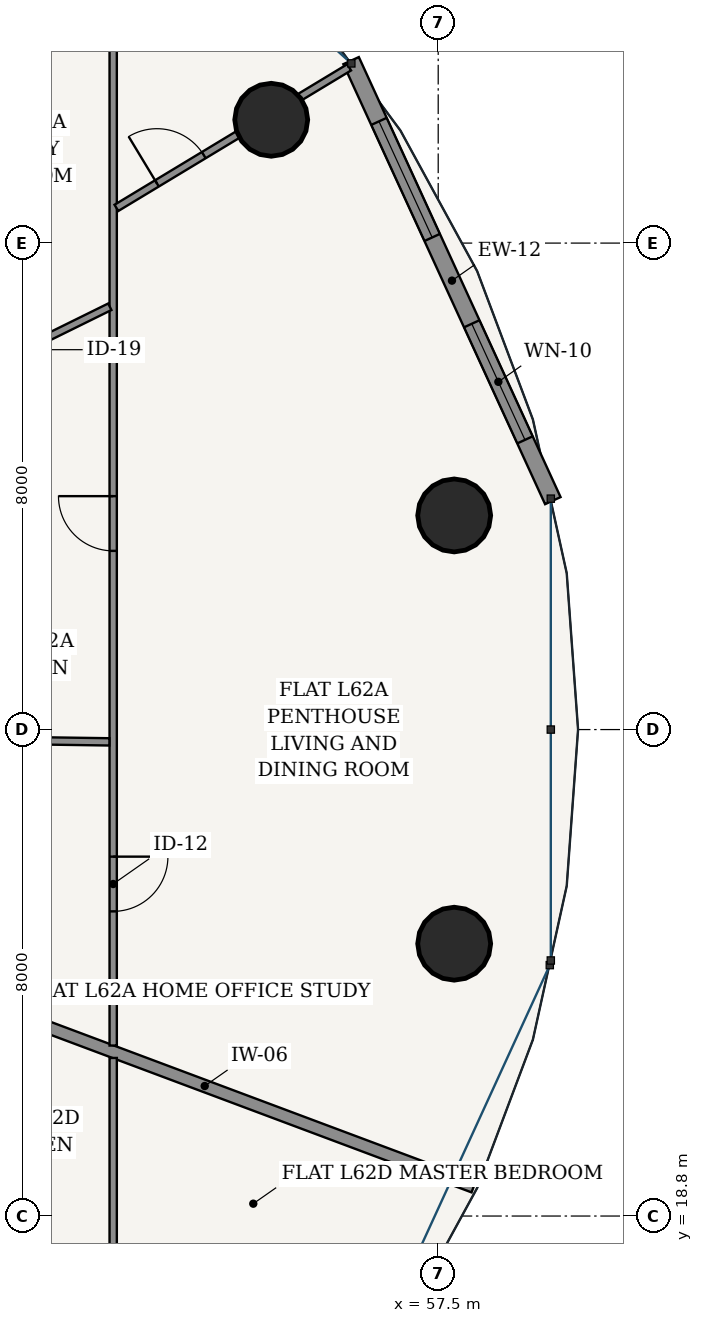
"""IFC4 building model, lengths in metres.
Left out: names, types, materials, properties, quantities, classifications, styles, units other than length and angle.
Written with IfcOpenShell. Run it as: python <this file> out.ifc"""

import sys

from ifc_helpers import new_model, si_unit, direction, frame, frame_2d, origin, origin_2d, place, context, subcontext, project, spatial, rectangle, hollow_circle, extrude, source, transform, mapped, element, fill, save


model = new_model("IFC4")
c1 = context("Model", 3, precision=1e-05, world=origin(), true_north=direction((-0.2419218956, 0.970295726276)))
c2 = subcontext(c1, "Body", "Model", "MODEL_VIEW")
j1 = project(units=[si_unit("LENGTHUNIT", "METRE"), si_unit("PLANEANGLEUNIT", "RADIAN")], contexts=[c1])
p1 = place(None, origin())
s1 = spatial("IfcSite", under=j1, at=p1, CompositionType="ELEMENT")
p2 = place(p1, origin())
s2 = spatial("IfcBuilding", under=s1, at=p2, CompositionType="ELEMENT")
p3 = place(p2, frame((0.0, 0.0, 235.6)))
s3 = spatial("IfcBuildingStorey", under=s2, at=p3, CompositionType="ELEMENT", Elevation=235.6)
for number, where, z_axis, x_axis in (
    (1, (57.763, 30.321, 0.0), (0.0, 0.0, 1.0), (1.0, 0.0, 0.0)),
    (2, (54.754, 36.828, 0.0), (0.0, 0.0, 1.0), (1.0, 0.0, 0.0)),
    (3, (57.763, 23.279, 0.0), (0.0, 0.0, 1.0), (1.0, 0.0, 0.0)),
):
    element("IfcColumn", number, at=place(p3, frame(where, z_axis=z_axis, x_axis=x_axis)), inside=s3, PredefinedType="COLUMN", context=c2, shape_type="SweptSolid", body=[
        extrude(hollow_circle(Radius=0.6, WallThickness=0.038, at=origin_2d()), origin(), (0.0, 0.0, 1.0), 3.7),
    ])
p4 = place(p3, frame((59.385, 30.565, 0.0), z_axis=(0.0, 0.0, 1.0), x_axis=(-0.416717018135, 0.909036262641, 0.0)))
e4 = element("IfcWall", 4, at=p4, inside=s3, PredefinedType="SOLIDWALL", context=c2, shape_type="SweptSolid", body=[
    extrude(rectangle(XDim=7.96, YDim=0.28, at=frame_2d((3.98, 0.0))), origin(), (0.0, 0.0, 1.0), 3.435),
])
p5 = place(p4, frame((1.099, 0.0, 0.85)))
e5 = element("IfcOpeningElement", 5, at=p5, cuts=e4, PredefinedType="OPENING", context=c2, shape_type="SweptSolid", body=[
    extrude(rectangle(XDim=2.1, YDim=1.95, at=frame_2d((1.05, 0.975))), frame((0.0, 0.15, 0.0), z_axis=(0.0, -1.0, 0.0), x_axis=(1.0, 0.0, 0.0)), (0.0, 0.0, 1.0), 0.3),
])
p6 = place(p4, frame((4.761, 0.0, 0.85)))
e6 = element("IfcOpeningElement", 6, at=p6, cuts=e4, PredefinedType="OPENING", context=c2, shape_type="SweptSolid", body=[
    extrude(rectangle(XDim=2.1, YDim=1.95, at=frame_2d((1.05, 0.975))), frame((0.0, 0.15, 0.0), z_axis=(0.0, -1.0, 0.0), x_axis=(1.0, 0.0, 0.0)), (0.0, 0.0, 1.0), 0.3),
])
p7 = place(p3, frame((49.237, 22.594, 0.0), z_axis=(0.0, 0.0, 1.0), x_axis=(0.936534016635, -0.350576718687, 0.0)))
e7 = element("IfcWall", 7, at=p7, inside=s3, PredefinedType="PARTITIONING", context=c2, shape_type="SweptSolid", body=[
    extrude(rectangle(XDim=9.446, YDim=0.2, at=frame_2d((4.723, 0.0))), origin(), (0.0, 0.0, 1.0), 2.951),
])
p8 = place(p3, frame((52.155, 38.105, 0.0), z_axis=(0.0, 0.0, 1.0), x_axis=(0.0, -1.0, 0.0)))
e8 = element("IfcWall", 8, at=p8, inside=s3, PredefinedType="PARTITIONING", context=c2, shape_type="SweptSolid", body=[
    extrude(rectangle(XDim=16.501, YDim=0.12, at=frame_2d((8.251, 0.0))), origin(), (0.0, 0.0, 1.0), 2.951),
])
p9 = place(p8, frame((13.395, 0.0, 0.0)))
e9 = element("IfcOpeningElement", 9, at=p9, cuts=e8, PredefinedType="OPENING", context=c2, shape_type="SweptSolid", body=[
    extrude(rectangle(XDim=0.9, YDim=2.15, at=frame_2d((0.45, 1.075))), frame((0.0, 0.07, 0.0), z_axis=(0.0, -1.0, 0.0), x_axis=(1.0, 0.0, 0.0)), (0.0, 0.0, 1.0), 0.14),
])
p10 = place(p8, frame((7.467, 0.0, 0.0)))
e10 = element("IfcOpeningElement", 10, at=p10, cuts=e8, PredefinedType="OPENING", context=c2, shape_type="SweptSolid", body=[
    extrude(rectangle(XDim=0.9, YDim=2.15, at=frame_2d((0.45, 1.075))), frame((0.0, 0.07, 0.0), z_axis=(0.0, -1.0, 0.0), x_axis=(1.0, 0.0, 0.0)), (0.0, 0.0, 1.0), 0.14),
])
p11 = place(p3, frame((52.208, 35.379, 0.0), z_axis=(0.0, 0.0, 1.0), x_axis=(0.856039372964, 0.516910622774, 0.0)))
e11 = element("IfcWall", 11, at=p11, inside=s3, PredefinedType="PARTITIONING", context=c2, shape_type="SweptSolid", body=[
    extrude(rectangle(XDim=4.471, YDim=0.12, at=frame_2d((2.236, 0.0))), origin(), (0.0, 0.0, 1.0), 2.951),
])
p12 = place(p11, frame((0.779, 0.0, 0.0)))
e12 = element("IfcOpeningElement", 12, at=p12, cuts=e11, PredefinedType="OPENING", context=c2, shape_type="SweptSolid", body=[
    extrude(rectangle(XDim=0.9, YDim=2.15, at=frame_2d((0.45, 1.075))), frame((0.0, 0.07, 0.0), z_axis=(0.0, -1.0, 0.0), x_axis=(1.0, 0.0, 0.0)), (0.0, 0.0, 1.0), 0.14),
])
p13 = place(p3, frame((49.237, 26.639, 0.0), z_axis=(0.0, 0.0, 1.0), x_axis=(0.999896890624, -0.014359948506, 0.0)))
e13 = element("IfcWall", 13, at=p13, inside=s3, PredefinedType="PARTITIONING", context=c2, shape_type="SweptSolid", body=[
    extrude(rectangle(XDim=2.856, YDim=0.12, at=frame_2d((1.428, 0.0))), origin(), (0.0, 0.0, 1.0), 3.435),
])
p14 = place(p3, frame((49.237, 32.341, 0.0), z_axis=(0.0, 0.0, 1.0), x_axis=(0.896876689717, 0.442280684004, 0.0)))
e14 = element("IfcWall", 14, at=p14, inside=s3, PredefinedType="PARTITIONING", context=c2, shape_type="SweptSolid", body=[
    extrude(rectangle(XDim=3.192, YDim=0.12, at=frame_2d((1.596, 0.0))), origin(), (0.0, 0.0, 1.0), 3.11),
])
p15 = place(p14, frame((1.166, 0.0, 0.0)))
e15 = element("IfcOpeningElement", 15, at=p15, cuts=e14, PredefinedType="OPENING", context=c2, shape_type="SweptSolid", body=[
    extrude(rectangle(XDim=0.86, YDim=2.15, at=frame_2d((0.43, 1.075))), frame((0.0, 0.07, 0.0), z_axis=(0.0, -1.0, 0.0), x_axis=(1.0, 0.0, 0.0)), (0.0, 0.0, 1.0), 0.14),
])
p16 = place(p3, frame((52.155, 21.4, 0.0), z_axis=(0.0, 0.0, 1.0), x_axis=(0.0, -1.0, 0.0)))
e16 = element("IfcWall", 16, at=p16, inside=s3, PredefinedType="PARTITIONING", context=c2, shape_type="SweptSolid", body=[
    extrude(rectangle(XDim=7.755, YDim=0.12, at=frame_2d((3.877, 0.0))), origin(), (0.0, 0.0, 1.0), 2.951),
])
p17 = place(p16, frame((3.214, 0.0, 0.0)))
e17 = element("IfcOpeningElement", 17, at=p17, cuts=e16, PredefinedType="OPENING", context=c2, shape_type="SweptSolid", body=[
    extrude(rectangle(XDim=0.9, YDim=2.15, at=frame_2d((0.45, 1.075))), frame((0.0, 0.07, 0.0), z_axis=(0.0, -1.0, 0.0), x_axis=(1.0, 0.0, 0.0)), (0.0, 0.0, 1.0), 0.14),
])
m1 = source(origin(), c2, "Body", "SweptSolid", [
    extrude(rectangle(XDim=2.1, YDim=1.95, at=frame_2d((1.05, 0.975))), frame((0.0, 0.03, 0.0), z_axis=(0.0, -1.0, 0.0), x_axis=(1.0, 0.0, 0.0)), (0.0, 0.0, 1.0), 0.06),
])
p18 = place(p5, origin())
e18 = element("IfcWindow", 18, at=p18, inside=s3, PartitioningType="SINGLE_PANEL", PredefinedType="WINDOW", context=c2, shape_type="MappedRepresentation", body=[
    mapped(m1, transform((0.0, 0.0, 0.0), scale=1.0)),
])
fill(e5, e18)
p19 = place(p6, origin())
e19 = element("IfcWindow", 19, at=p19, inside=s3, PartitioningType="SINGLE_PANEL", PredefinedType="WINDOW", context=c2, shape_type="MappedRepresentation", body=[
    mapped(m1, transform((0.0, 0.0, 0.0), scale=1.0)),
])
fill(e6, e19)
m2 = source(origin(), c2, "Body", "SweptSolid", [
    extrude(rectangle(XDim=0.9, YDim=2.15, at=frame_2d((0.45, 1.075))), frame((0.0, 0.025, 0.0), z_axis=(0.0, -1.0, 0.0), x_axis=(1.0, 0.0, 0.0)), (0.0, 0.0, 1.0), 0.05),
])
p20 = place(p9, origin())
e20 = element("IfcDoor", 20, at=p20, inside=s3, OperationType="SINGLE_SWING_LEFT", PredefinedType="DOOR", context=c2, shape_type="MappedRepresentation", body=[
    mapped(m2, transform((0.0, 0.0, 0.0), scale=1.0)),
])
fill(e9, e20)
p21 = place(p10, frame((0.9, 0.0, 0.0), z_axis=(0.0, 0.0, 1.0), x_axis=(-1.0, 0.0, 0.0)))
e21 = element("IfcDoor", 21, at=p21, inside=s3, OperationType="SINGLE_SWING_RIGHT", PredefinedType="DOOR", context=c2, shape_type="MappedRepresentation", body=[
    mapped(m2, transform((0.0, 0.0, 0.0), scale=1.0)),
])
fill(e10, e21)
p22 = place(p12, origin())
e22 = element("IfcDoor", 22, at=p22, inside=s3, OperationType="SINGLE_SWING_LEFT", PredefinedType="DOOR", context=c2, shape_type="MappedRepresentation", body=[
    mapped(m2, transform((0.0, 0.0, 0.0), scale=1.0)),
])
fill(e12, e22)
save(model, sys.argv[1])
